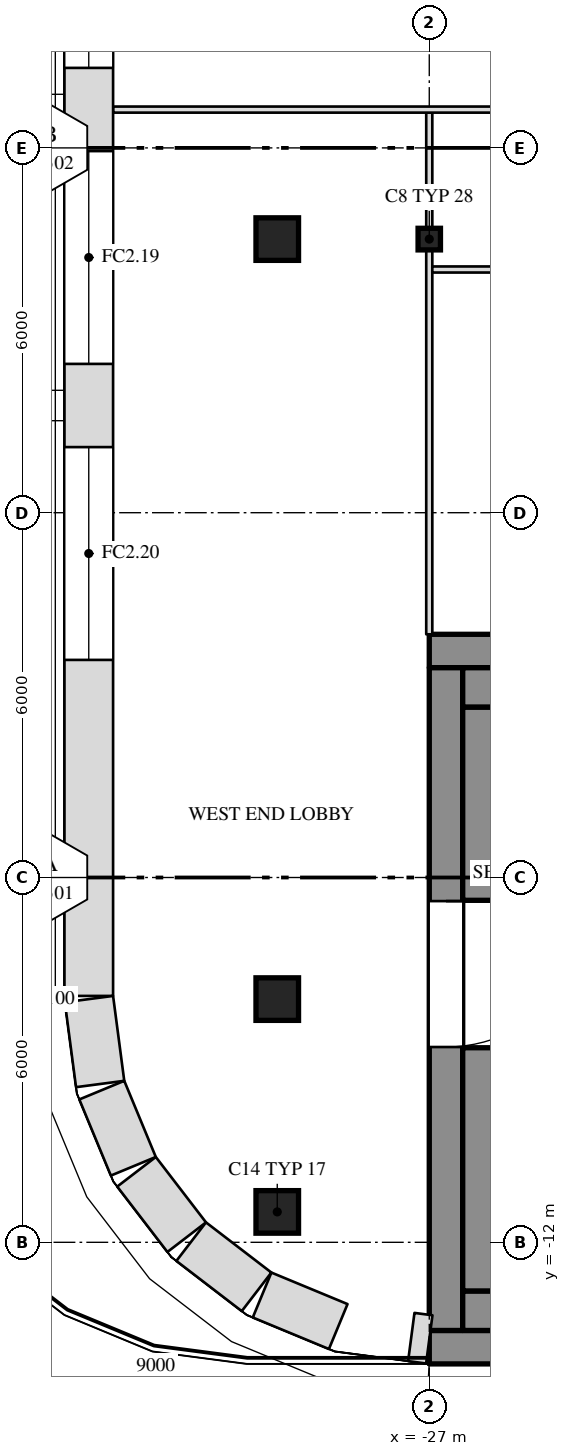
"""IFC4 building model, lengths in metres.
Left out: names, types, materials, properties, quantities, classifications, styles, units other than length and angle.
Written with IfcOpenShell. Run it as: python <this file> out.ifc"""

import sys

from ifc_helpers import new_model, si_unit, direction, frame, frame_2d, origin, origin_2d, place, context, subcontext, project, spatial, rectangle, i_section, extrude, element, fill, save


model = new_model("IFC4")
c1 = context("Model", 3, precision=1e-05, world=origin(), true_north=direction((0.0, 1.0)))
c2 = subcontext(c1, "Body", "Model", "MODEL_VIEW")
j1 = project(units=[si_unit("LENGTHUNIT", "METRE"), si_unit("PLANEANGLEUNIT", "RADIAN")], contexts=[c1])
p1 = place(None, origin())
s1 = spatial("IfcSite", under=j1, at=p1, CompositionType="ELEMENT")
p2 = place(p1, origin())
s2 = spatial("IfcBuilding", under=s1, at=p2, CompositionType="ELEMENT")
p3 = place(p2, frame((0.0, 0.0, 284.5)))
s3 = spatial("IfcBuildingStorey", under=s2, at=p3, CompositionType="ELEMENT", Elevation=284.5)
for number, where, z_axis, x_axis in (
    (1, (-29.5, -11.5, 0.0), (0.0, 0.0, 1.0), (1.0, 0.0, 0.0)),
    (2, (-29.5, -8.0, 0.0), (0.0, 0.0, 1.0), (1.0, 0.0, 0.0)),
    (3, (-29.5, 4.5, 0.0), (0.0, 0.0, 1.0), (1.0, 0.0, 0.0)),
):
    element("IfcColumn", number, at=place(p3, frame(where, z_axis=z_axis, x_axis=x_axis)), inside=s3, PredefinedType="COLUMN", context=c2, shape_type="SweptSolid", body=[
        extrude(rectangle(XDim=0.7, YDim=0.7, at=origin_2d()), origin(), (0.0, 0.0, 1.0), 4.0),
    ])
p4 = place(p3, frame((-27.0, 4.5, 0.0), z_axis=(0.0, 0.0, 1.0), x_axis=(1.0, 0.0, 0.0)))
e4 = element("IfcColumn", 4, at=p4, inside=s3, PredefinedType="COLUMN", context=c2, shape_type="SweptSolid", body=[
    extrude(i_section(OverallWidth=0.368, OverallDepth=0.356, WebThickness=0.011, FlangeThickness=0.018, at=origin_2d()), origin(), (0.0, 0.0, 1.0), 4.0),
])
p5 = place(p3, frame((-27.0, -2.275, 0.0), z_axis=(0.0, 0.0, 1.0), x_axis=(1.0, 0.0, 0.0)))
e5 = element("IfcWall", 5, at=p5, inside=s3, PredefinedType="SHEAR", context=c2, shape_type="SweptSolid", body=[
    extrude(rectangle(XDim=54.0, YDim=0.55, at=frame_2d((27.0, 0.0))), origin(), (0.0, 0.0, 1.0), 3.78),
])
p6 = place(p5, frame((15.15, 0.0, 0.0)))
e6 = element("IfcOpeningElement", 6, at=p6, cuts=e5, PredefinedType="OPENING", context=c2, shape_type="SweptSolid", body=[
    extrude(rectangle(XDim=2.4, YDim=2.1, at=frame_2d((1.2, 1.05))), frame((0.0, 0.287, 0.0), z_axis=(0.0, -1.0, 0.0), x_axis=(1.0, 0.0, 0.0)), (0.0, 0.0, 1.0), 0.574),
])
p7 = place(p5, frame((36.45, 0.0, 0.0)))
e7 = element("IfcOpeningElement", 7, at=p7, cuts=e5, PredefinedType="OPENING", context=c2, shape_type="SweptSolid", body=[
    extrude(rectangle(XDim=2.4, YDim=2.1, at=frame_2d((1.2, 1.05))), frame((0.0, 0.287, 0.0), z_axis=(0.0, -1.0, 0.0), x_axis=(1.0, 0.0, 0.0)), (0.0, 0.0, 1.0), 0.574),
])
p8 = place(p3, frame((-27.0, -13.725, 0.0), z_axis=(0.0, 0.0, 1.0), x_axis=(1.0, 0.0, 0.0)))
e8 = element("IfcWall", 8, at=p8, inside=s3, PredefinedType="SHEAR", context=c2, shape_type="SweptSolid", body=[
    extrude(rectangle(XDim=54.0, YDim=0.55, at=frame_2d((27.0, 0.0))), origin(), (0.0, 0.0, 1.0), 3.78),
])
p9 = place(p3, frame((-26.725, -13.45, 0.0), z_axis=(0.0, 0.0, 1.0), x_axis=(0.0, 1.0, 0.0)))
e9 = element("IfcWall", 9, at=p9, inside=s3, PredefinedType="SHEAR", context=c2, shape_type="SweptSolid", body=[
    extrude(rectangle(XDim=10.9, YDim=0.55, at=frame_2d((5.45, 0.0))), origin(), (0.0, 0.0, 1.0), 3.78),
])
p10 = place(p9, frame((4.662, 0.0, 0.0)))
e10 = element("IfcOpeningElement", 10, at=p10, cuts=e9, PredefinedType="OPENING", context=c2, shape_type="SweptSolid", body=[
    extrude(rectangle(XDim=2.4, YDim=2.1, at=frame_2d((1.2, 1.05))), frame((0.0, 0.287, 0.0), z_axis=(0.0, -1.0, 0.0), x_axis=(1.0, 0.0, 0.0)), (0.0, 0.0, 1.0), 0.574),
])
p11 = place(p3, frame((-26.45, -2.875, 0.0), z_axis=(0.0, 0.0, 1.0), x_axis=(1.0, 0.0, 0.0)))
e11 = element("IfcWall", 11, at=p11, inside=s3, PredefinedType="SHEAR", context=c2, shape_type="SweptSolid", body=[
    extrude(rectangle(XDim=14.45, YDim=0.65, at=frame_2d((7.225, 0.0))), origin(), (0.0, 0.0, 1.0), 3.78),
])
p12 = place(p3, frame((-26.45, -13.125, 0.0), z_axis=(0.0, 0.0, 1.0), x_axis=(1.0, 0.0, 0.0)))
e12 = element("IfcWall", 12, at=p12, inside=s3, PredefinedType="SHEAR", context=c2, shape_type="SweptSolid", body=[
    extrude(rectangle(XDim=52.9, YDim=0.65, at=frame_2d((26.45, 0.0))), origin(), (0.0, 0.0, 1.0), 3.78),
])
p13 = place(p3, frame((-26.125, -12.8, 0.0), z_axis=(0.0, 0.0, 1.0), x_axis=(0.0, 1.0, 0.0)))
e13 = element("IfcWall", 13, at=p13, inside=s3, PredefinedType="SHEAR", context=c2, shape_type="SweptSolid", body=[
    extrude(rectangle(XDim=4.0, YDim=0.65, at=frame_2d((2.0, 0.0))), origin(), (0.0, 0.0, 1.0), 3.78),
])
p14 = place(p3, frame((-26.125, -6.375, 0.0), z_axis=(0.0, 0.0, 1.0), x_axis=(0.0, 1.0, 0.0)))
e14 = element("IfcWall", 14, at=p14, inside=s3, PredefinedType="SHEAR", context=c2, shape_type="SweptSolid", body=[
    extrude(rectangle(XDim=3.175, YDim=0.65, at=frame_2d((1.587, 0.0))), origin(), (0.0, 0.0, 1.0), 3.78),
])
p15 = place(p3, frame((-27.0, -2.0, 0.0), z_axis=(0.0, 0.0, 1.0), x_axis=(0.0, 1.0, 0.0)))
e15 = element("IfcWall", 15, at=p15, inside=s3, PredefinedType="PARTITIONING", context=c2, shape_type="SweptSolid", body=[
    extrude(rectangle(XDim=6.322, YDim=0.1, at=frame_2d((3.161, 0.0))), origin(), (0.0, 0.0, 1.0), 3.247),
])
p16 = place(p3, frame((-27.0, 4.678, 0.0), z_axis=(0.0, 0.0, 1.0), x_axis=(0.0, 1.0, 0.0)))
e16 = element("IfcWall", 16, at=p16, inside=s3, PredefinedType="PARTITIONING", context=c2, shape_type="SweptSolid", body=[
    extrude(rectangle(XDim=1.902, YDim=0.1, at=frame_2d((0.951, 0.0))), origin(), (0.0, 0.0, 1.0), 3.247),
])
p17 = place(p3, frame((-26.95, 4.0, 0.0), z_axis=(0.0, 0.0, 1.0), x_axis=(1.0, 0.0, 0.0)))
e17 = element("IfcWall", 17, at=p17, inside=s3, PredefinedType="PARTITIONING", context=c2, shape_type="SweptSolid", body=[
    extrude(rectangle(XDim=9.5, YDim=0.1, at=frame_2d((4.75, 0.0))), origin(), (0.0, 0.0, 1.0), 3.78),
])
p18 = place(p17, frame((4.25, 0.0, 0.0)))
e18 = element("IfcOpeningElement", 18, at=p18, cuts=e17, PredefinedType="OPENING", context=c2, shape_type="SweptSolid", body=[
    extrude(rectangle(XDim=0.9, YDim=2.1, at=frame_2d((0.45, 1.05))), frame((0.0, 0.062, 0.0), z_axis=(0.0, -1.0, 0.0), x_axis=(1.0, 0.0, 0.0)), (0.0, 0.0, 1.0), 0.124),
])
p19 = place(p3, frame((-32.2, 6.63, 0.0), z_axis=(0.0, 0.0, 1.0), x_axis=(1.0, 0.0, 0.0)))
e19 = element("IfcWall", 19, at=p19, inside=s3, PredefinedType="PARTITIONING", context=c2, shape_type="SweptSolid", body=[
    extrude(rectangle(XDim=14.75, YDim=0.1, at=frame_2d((7.375, 0.0))), origin(), (0.0, 0.0, 1.0), 3.78),
])
p20 = place(p3, frame((-32.6, 30.948, 0.0), z_axis=(0.0, 0.0, 1.0), x_axis=(0.0, -1.0, 0.0)))
e20 = element("IfcWall", 20, at=p20, inside=s3, PredefinedType="SOLIDWALL", context=c2, shape_type="SweptSolid", body=[
    extrude(rectangle(XDim=38.895, YDim=0.8, at=frame_2d((19.448, 0.0))), origin(), (0.0, 0.0, 1.0), 3.78),
])
p21 = place(p20, frame((5.526, 0.0, 1.0)))
e21 = element("IfcOpeningElement", 21, at=p21, cuts=e20, PredefinedType="OPENING", context=c2, shape_type="SweptSolid", body=[
    extrude(rectangle(XDim=3.5, YDim=2.5, at=frame_2d((1.75, 1.25))), frame((0.0, 0.412, 0.0), z_axis=(0.0, -1.0, 0.0), x_axis=(1.0, 0.0, 0.0)), (0.0, 0.0, 1.0), 0.824),
])
p22 = place(p20, frame((10.395, 0.0, 1.0)))
e22 = element("IfcOpeningElement", 22, at=p22, cuts=e20, PredefinedType="OPENING", context=c2, shape_type="SweptSolid", body=[
    extrude(rectangle(XDim=3.5, YDim=2.5, at=frame_2d((1.75, 1.25))), frame((0.0, 0.412, 0.0), z_axis=(0.0, -1.0, 0.0), x_axis=(1.0, 0.0, 0.0)), (0.0, 0.0, 1.0), 0.824),
])
p23 = place(p20, frame((20.132, 0.0, 1.0)))
e23 = element("IfcOpeningElement", 23, at=p23, cuts=e20, PredefinedType="OPENING", context=c2, shape_type="SweptSolid", body=[
    extrude(rectangle(XDim=3.5, YDim=2.5, at=frame_2d((1.75, 1.25))), frame((0.0, 0.412, 0.0), z_axis=(0.0, -1.0, 0.0), x_axis=(1.0, 0.0, 0.0)), (0.0, 0.0, 1.0), 0.824),
])
p24 = place(p20, frame((25.0, 0.0, 1.0)))
e24 = element("IfcOpeningElement", 24, at=p24, cuts=e20, PredefinedType="OPENING", context=c2, shape_type="SweptSolid", body=[
    extrude(rectangle(XDim=3.5, YDim=2.5, at=frame_2d((1.75, 1.25))), frame((0.0, 0.412, 0.0), z_axis=(0.0, -1.0, 0.0), x_axis=(1.0, 0.0, 0.0)), (0.0, 0.0, 1.0), 0.824),
])
p25 = place(p20, frame((29.869, 0.0, 1.0)))
e25 = element("IfcOpeningElement", 25, at=p25, cuts=e20, PredefinedType="OPENING", context=c2, shape_type="SweptSolid", body=[
    extrude(rectangle(XDim=3.5, YDim=2.5, at=frame_2d((1.75, 1.25))), frame((0.0, 0.412, 0.0), z_axis=(0.0, -1.0, 0.0), x_axis=(1.0, 0.0, 0.0)), (0.0, 0.0, 1.0), 0.824),
])
p26 = place(p20, frame((15.079, 0.0, 0.0)))
e26 = element("IfcOpeningElement", 26, at=p26, cuts=e20, PredefinedType="OPENING", context=c2, shape_type="SweptSolid", body=[
    extrude(rectangle(XDim=1.8, YDim=2.4, at=frame_2d((0.9, 1.2))), frame((0.0, 0.412, 0.0), z_axis=(0.0, -1.0, 0.0), x_axis=(1.0, 0.0, 0.0)), (0.0, 0.0, 1.0), 0.824),
])
p27 = place(p3, frame((-32.597, -8.0, 0.0), z_axis=(0.0, 0.0, 1.0), x_axis=(0.130517283865, -0.99144603414, 0.0)))
e27 = element("IfcWall", 27, at=p27, inside=s3, PredefinedType="SOLIDWALL", context=c2, shape_type="SweptSolid", body=[
    extrude(rectangle(XDim=1.408, YDim=0.8, at=frame_2d((0.704, 0.0))), origin(), (0.0, 0.0, 1.0), 3.78),
])
p28 = place(p3, frame((-32.386, -9.497, 0.0), z_axis=(0.0, 0.0, 1.0), x_axis=(0.38276009378, -0.923847774587, 0.0)))
e28 = element("IfcWall", 28, at=p28, inside=s3, PredefinedType="SOLIDWALL", context=c2, shape_type="SweptSolid", body=[
    extrude(rectangle(XDim=1.355, YDim=0.8, at=frame_2d((0.678, 0.0))), origin(), (0.0, 0.0, 1.0), 3.78),
])
for number, where, z_axis, x_axis in (
    (29, (-31.815, -10.84, 0.0), (0.0, 0.0, 1.0), (0.609, -0.793, 0.0)),
    (30, (-30.916, -11.989, 0.0), (0.0, 0.0, 1.0), (0.793, -0.609, 0.0)),
):
    element("IfcWall", number, at=place(p3, frame(where, z_axis=z_axis, x_axis=x_axis)), inside=s3, PredefinedType="SOLIDWALL", context=c2, shape_type="SweptSolid", body=[
        extrude(rectangle(XDim=1.356, YDim=0.8, at=frame_2d((0.678, 0.0))), origin(), (0.0, 0.0, 1.0), 3.78),
    ])
p29 = place(p3, frame((-29.75, -12.867, 0.0), z_axis=(0.0, 0.0, 1.0), x_axis=(0.923847774587, -0.38276009378, 0.0)))
e31 = element("IfcWall", 31, at=p29, inside=s3, PredefinedType="SOLIDWALL", context=c2, shape_type="SweptSolid", body=[
    extrude(rectangle(XDim=1.355, YDim=0.8, at=frame_2d((0.678, 0.0))), origin(), (0.0, 0.0, 1.0), 3.78),
])
p30 = place(p3, frame((-27.296, -13.558, 0.0), z_axis=(0.0, 0.0, 1.0), x_axis=(0.991398522068, -0.130877692682, 0.0)))
e32 = element("IfcWall", 32, at=p30, inside=s3, PredefinedType="SOLIDWALL", context=c2, shape_type="SweptSolid", body=[
    extrude(rectangle(XDim=0.299, YDim=0.8, at=frame_2d((0.149, 0.0))), origin(), (0.0, 0.0, 1.0), 3.78),
])
p31 = place(p23, origin())
e33 = element("IfcWindow", 33, at=p31, inside=s3, PartitioningType="SINGLE_PANEL", PredefinedType="WINDOW", context=c2, shape_type="SweptSolid", body=[
    extrude(rectangle(XDim=3.5, YDim=2.5, at=frame_2d((1.75, 1.25))), frame((0.0, 0.03, 0.0), z_axis=(0.0, -1.0, 0.0), x_axis=(1.0, 0.0, 0.0)), (0.0, 0.0, 1.0), 0.06),
])
fill(e23, e33)
p32 = place(p24, origin())
e34 = element("IfcWindow", 34, at=p32, inside=s3, PartitioningType="SINGLE_PANEL", PredefinedType="WINDOW", context=c2, shape_type="SweptSolid", body=[
    extrude(rectangle(XDim=3.5, YDim=2.5, at=frame_2d((1.75, 1.25))), frame((0.0, 0.03, 0.0), z_axis=(0.0, -1.0, 0.0), x_axis=(1.0, 0.0, 0.0)), (0.0, 0.0, 1.0), 0.06),
])
fill(e24, e34)
p33 = place(p25, origin())
e35 = element("IfcWindow", 35, at=p33, inside=s3, PartitioningType="SINGLE_PANEL", PredefinedType="WINDOW", context=c2, shape_type="SweptSolid", body=[
    extrude(rectangle(XDim=3.5, YDim=2.5, at=frame_2d((1.75, 1.25))), frame((0.0, 0.03, 0.0), z_axis=(0.0, -1.0, 0.0), x_axis=(1.0, 0.0, 0.0)), (0.0, 0.0, 1.0), 0.06),
])
fill(e25, e35)
p34 = place(p10, origin())
e36 = element("IfcDoor", 36, at=p34, inside=s3, OperationType="DOUBLE_DOOR_SINGLE_SWING", PredefinedType="DOOR", context=c2, shape_type="SweptSolid", body=[
    extrude(rectangle(XDim=2.4, YDim=2.1, at=frame_2d((1.2, 1.05))), frame((0.0, 0.025, 0.0), z_axis=(0.0, -1.0, 0.0), x_axis=(1.0, 0.0, 0.0)), (0.0, 0.0, 1.0), 0.05),
])
fill(e10, e36)
save(model, sys.argv[1])
